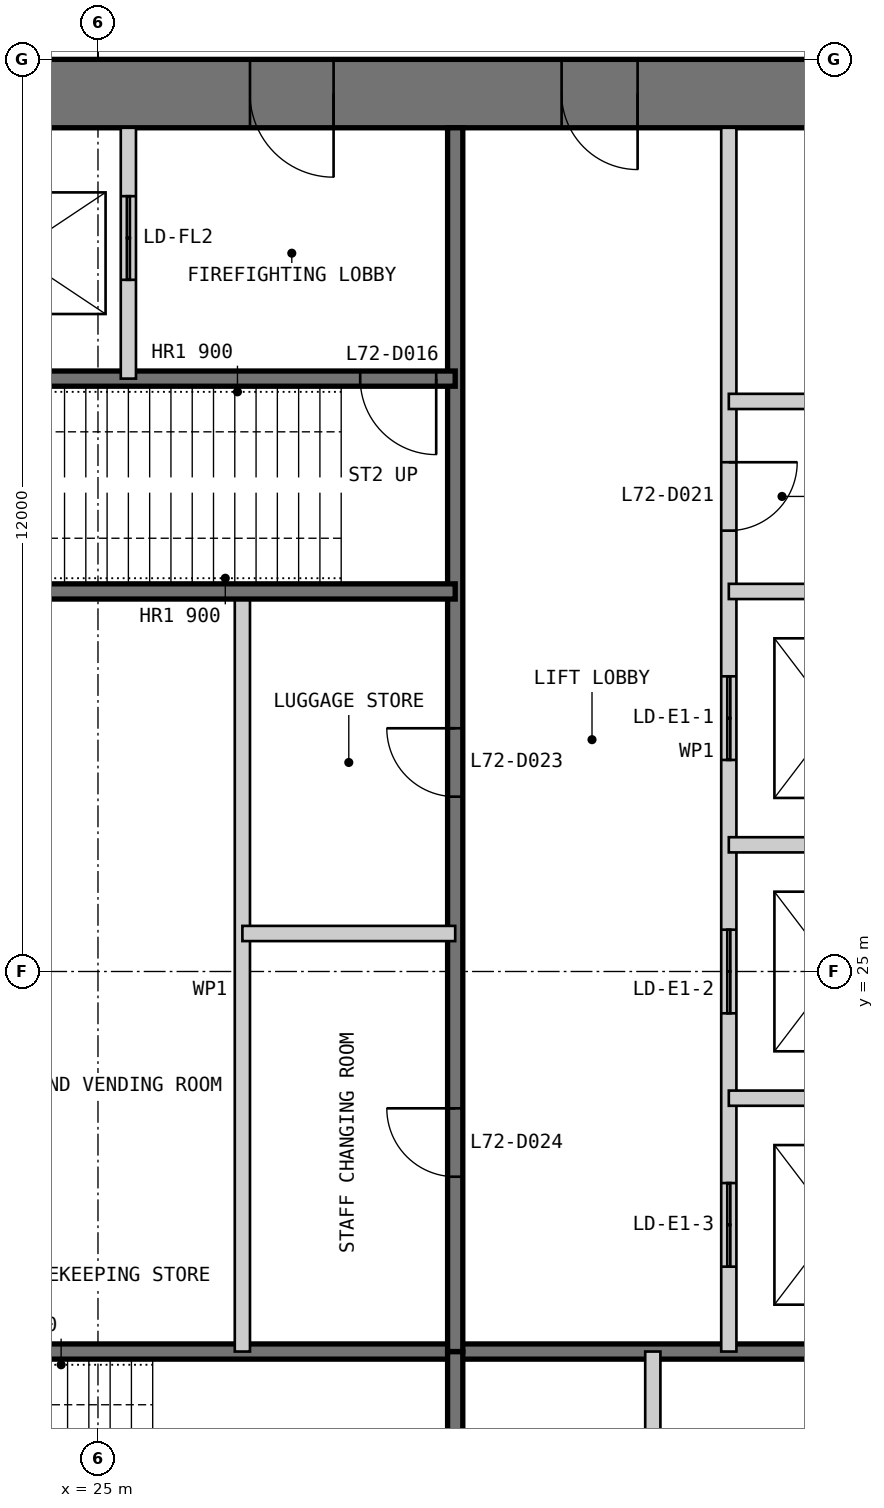
"""IFC4 building model, lengths in metres.
Left out: names, types, materials, properties, quantities, classifications, styles, units other than length and angle.
Written with IfcOpenShell. Run it as: python <this file> out.ifc"""

import sys

from ifc_helpers import new_model, si_unit, direction, frame, frame_2d, origin, place, context, subcontext, project, spatial, polyline, rectangle, outline, extrude, element, fill, save


model = new_model("IFC4")
c1 = context("Model", 3, precision=1e-05, world=origin(), true_north=direction((0.0, 1.0)))
c2 = subcontext(c1, "Body", "Model", "MODEL_VIEW")
j1 = project(units=[si_unit("LENGTHUNIT", "METRE"), si_unit("PLANEANGLEUNIT", "RADIAN")], contexts=[c1])
p1 = place(None, origin())
s1 = spatial("IfcSite", under=j1, at=p1, CompositionType="ELEMENT")
p2 = place(p1, origin())
s2 = spatial("IfcBuilding", under=s1, at=p2, CompositionType="ELEMENT")
p3 = place(p2, frame((0.0, 0.0, 296.8)))
s3 = spatial("IfcBuildingStorey", under=s2, at=p3, CompositionType="ELEMENT", Elevation=296.8)
p4 = place(p3, frame((37.0, 36.55, 0.0), z_axis=(0.0, 0.0, 1.0), x_axis=(-1.0, 0.0, 0.0)))
e1 = element("IfcWall", 1, at=p4, inside=s3, PredefinedType="SHEAR", context=c2, shape_type="SweptSolid", body=[
    extrude(outline(polyline([(0.0, -0.45), (24.0, -0.45), (23.1, 0.45), (0.9, 0.45), (0.0, -0.45)])), origin(), (0.0, 0.0, 1.0), 5.0),
])
p5 = place(p4, frame((4.9, 0.0, 0.0)))
e2 = element("IfcOpeningElement", 2, at=p5, cuts=e1, PredefinedType="OPENING", context=c2, shape_type="SweptSolid", body=[
    extrude(rectangle(XDim=1.0, YDim=2.2, at=frame_2d((0.5, 1.1))), frame((0.0, 0.46, 0.0), z_axis=(0.0, -1.0, 0.0), x_axis=(1.0, 0.0, 0.0)), (0.0, 0.0, 1.0), 0.92),
])
p6 = place(p4, frame((8.9, 0.0, 0.0)))
e3 = element("IfcOpeningElement", 3, at=p6, cuts=e1, PredefinedType="OPENING", context=c2, shape_type="SweptSolid", body=[
    extrude(rectangle(XDim=1.1, YDim=2.2, at=frame_2d((0.55, 1.1))), frame((0.0, 0.46, 0.0), z_axis=(0.0, -1.0, 0.0), x_axis=(1.0, 0.0, 0.0)), (0.0, 0.0, 1.0), 0.92),
])
p7 = place(p4, frame((15.05, 0.0, 0.0)))
e4 = element("IfcOpeningElement", 4, at=p7, cuts=e1, PredefinedType="OPENING", context=c2, shape_type="SweptSolid", body=[
    extrude(rectangle(XDim=0.9, YDim=2.2, at=frame_2d((0.45, 1.1))), frame((0.0, 0.46, 0.0), z_axis=(0.0, -1.0, 0.0), x_axis=(1.0, 0.0, 0.0)), (0.0, 0.0, 1.0), 0.92),
])
p8 = place(p4, frame((17.9, 0.0, 0.0)))
e5 = element("IfcOpeningElement", 5, at=p8, cuts=e1, PredefinedType="OPENING", context=c2, shape_type="SweptSolid", body=[
    extrude(rectangle(XDim=1.0, YDim=2.2, at=frame_2d((0.5, 1.1))), frame((0.0, 0.46, 0.0), z_axis=(0.0, -1.0, 0.0), x_axis=(1.0, 0.0, 0.0)), (0.0, 0.0, 1.0), 0.92),
])
p9 = place(p4, frame((21.4, 0.0, 0.0)))
e6 = element("IfcOpeningElement", 6, at=p9, cuts=e1, PredefinedType="OPENING", context=c2, shape_type="SweptSolid", body=[
    extrude(rectangle(XDim=1.0, YDim=2.2, at=frame_2d((0.5, 1.1))), frame((0.0, 0.46, 0.0), z_axis=(0.0, -1.0, 0.0), x_axis=(1.0, 0.0, 0.0)), (0.0, 0.0, 1.0), 0.92),
])
p10 = place(p3, frame((20.3, 20.0, 0.0), z_axis=(0.0, 0.0, 1.0), x_axis=(1.0, 0.0, 0.0)))
e7 = element("IfcWall", 7, at=p10, inside=s3, PredefinedType="SOLIDWALL", context=c2, shape_type="SweptSolid", body=[
    extrude(rectangle(XDim=15.8, YDim=0.2, at=frame_2d((7.9, 0.0))), origin(), (0.0, 0.0, 1.0), 4.8),
])
p11 = place(p3, frame((29.7, 13.9, 0.0), z_axis=(0.0, 0.0, 1.0), x_axis=(0.0, 1.0, 0.0)))
e8 = element("IfcWall", 8, at=p11, inside=s3, PredefinedType="SOLIDWALL", context=c2, shape_type="SweptSolid", body=[
    extrude(rectangle(XDim=6.1, YDim=0.2, at=frame_2d((3.05, 0.0))), origin(), (0.0, 0.0, 1.0), 4.8),
])
p12 = place(p3, frame((32.3, 13.9, 0.0), z_axis=(0.0, 0.0, 1.0), x_axis=(0.0, 1.0, 0.0)))
e9 = element("IfcWall", 9, at=p12, inside=s3, PredefinedType="PARTITIONING", context=c2, shape_type="SweptSolid", body=[
    extrude(rectangle(XDim=6.1, YDim=0.2, at=frame_2d((3.05, 0.0))), origin(), (0.0, 0.0, 1.0), 4.8),
])
p13 = place(p3, frame((33.3, 36.1, 0.0), z_axis=(0.0, 0.0, 1.0), x_axis=(0.0, -1.0, 0.0)))
e10 = element("IfcWall", 10, at=p13, inside=s3, PredefinedType="PARTITIONING", context=c2, shape_type="SweptSolid", body=[
    extrude(rectangle(XDim=16.1, YDim=0.2, at=frame_2d((8.05, 0.0))), origin(), (0.0, 0.0, 1.0), 4.8),
])
p14 = place(p13, frame((4.4, 0.0, 0.0)))
e11 = element("IfcOpeningElement", 11, at=p14, cuts=e10, PredefinedType="OPENING", context=c2, shape_type="SweptSolid", body=[
    extrude(rectangle(XDim=0.9, YDim=2.2, at=frame_2d((0.45, 1.1))), frame((0.0, 0.11, 0.0), z_axis=(0.0, -1.0, 0.0), x_axis=(1.0, 0.0, 0.0)), (0.0, 0.0, 1.0), 0.22),
])
p15 = place(p13, frame((7.217, 0.0, 0.0)))
e12 = element("IfcOpeningElement", 12, at=p15, cuts=e10, PredefinedType="OPENING", context=c2, shape_type="SweptSolid", body=[
    extrude(rectangle(XDim=1.1, YDim=2.2, at=frame_2d((0.55, 1.1))), frame((0.0, 0.11, 0.0), z_axis=(0.0, -1.0, 0.0), x_axis=(1.0, 0.0, 0.0)), (0.0, 0.0, 1.0), 0.22),
])
p16 = place(p13, frame((10.55, 0.0, 0.0)))
e13 = element("IfcOpeningElement", 13, at=p16, cuts=e10, PredefinedType="OPENING", context=c2, shape_type="SweptSolid", body=[
    extrude(rectangle(XDim=1.1, YDim=2.2, at=frame_2d((0.55, 1.1))), frame((0.0, 0.11, 0.0), z_axis=(0.0, -1.0, 0.0), x_axis=(1.0, 0.0, 0.0)), (0.0, 0.0, 1.0), 0.22),
])
p17 = place(p13, frame((13.883, 0.0, 0.0)))
e14 = element("IfcOpeningElement", 14, at=p17, cuts=e10, PredefinedType="OPENING", context=c2, shape_type="SweptSolid", body=[
    extrude(rectangle(XDim=1.1, YDim=2.2, at=frame_2d((0.55, 1.1))), frame((0.0, 0.11, 0.0), z_axis=(0.0, -1.0, 0.0), x_axis=(1.0, 0.0, 0.0)), (0.0, 0.0, 1.0), 0.22),
])
p18 = place(p3, frame((29.7, 36.1, 0.0), z_axis=(0.0, 0.0, 1.0), x_axis=(0.0, -1.0, 0.0)))
e15 = element("IfcWall", 15, at=p18, inside=s3, PredefinedType="SOLIDWALL", context=c2, shape_type="SweptSolid", body=[
    extrude(rectangle(XDim=16.1, YDim=0.2, at=frame_2d((8.05, 0.0))), origin(), (0.0, 0.0, 1.0), 4.8),
])
p19 = place(p18, frame((7.9, 0.0, 0.0)))
e16 = element("IfcOpeningElement", 16, at=p19, cuts=e15, PredefinedType="OPENING", context=c2, shape_type="SweptSolid", body=[
    extrude(rectangle(XDim=0.9, YDim=2.2, at=frame_2d((0.45, 1.1))), frame((0.0, 0.11, 0.0), z_axis=(0.0, -1.0, 0.0), x_axis=(1.0, 0.0, 0.0)), (0.0, 0.0, 1.0), 0.22),
])
p20 = place(p18, frame((12.9, 0.0, 0.0)))
e17 = element("IfcOpeningElement", 17, at=p20, cuts=e15, PredefinedType="OPENING", context=c2, shape_type="SweptSolid", body=[
    extrude(rectangle(XDim=0.9, YDim=2.2, at=frame_2d((0.45, 1.1))), frame((0.0, 0.11, 0.0), z_axis=(0.0, -1.0, 0.0), x_axis=(1.0, 0.0, 0.0)), (0.0, 0.0, 1.0), 0.22),
])
for number, where, z_axis, x_axis in (
    (18, (36.1, 30.0, 0.0), (0.0, 0.0, 1.0), (-1.0, 0.0, 0.0)),
    (19, (36.1, 26.667, 0.0), (0.0, 0.0, 1.0), (-1.0, 0.0, 0.0)),
    (20, (36.1, 23.333, 0.0), (0.0, 0.0, 1.0), (-1.0, 0.0, 0.0)),
):
    element("IfcWall", number, at=place(p3, frame(where, z_axis=z_axis, x_axis=x_axis)), inside=s3, PredefinedType="PARTITIONING", context=c2, shape_type="SweptSolid", body=[
        extrude(rectangle(XDim=2.8, YDim=0.2, at=frame_2d((1.4, 0.0))), origin(), (0.0, 0.0, 1.0), 4.8),
    ])
p21 = place(p3, frame((26.9, 30.0, 0.0), z_axis=(0.0, 0.0, 1.0), x_axis=(0.0, -1.0, 0.0)))
e21 = element("IfcWall", 21, at=p21, inside=s3, PredefinedType="PARTITIONING", context=c2, shape_type="SweptSolid", body=[
    extrude(rectangle(XDim=10.0, YDim=0.2, at=frame_2d((5.0, 0.0))), origin(), (0.0, 0.0, 1.0), 4.8),
])
p22 = place(p3, frame((29.7, 32.8, 0.0), z_axis=(0.0, 0.0, 1.0), x_axis=(-1.0, 0.0, 0.0)))
e22 = element("IfcWall", 22, at=p22, inside=s3, PredefinedType="SOLIDWALL", context=c2, shape_type="SweptSolid", body=[
    extrude(rectangle(XDim=9.4, YDim=0.2, at=frame_2d((4.7, 0.0))), origin(), (0.0, 0.0, 1.0), 4.8),
])
p23 = place(p22, frame((0.25, 0.0, 0.0)))
e23 = element("IfcOpeningElement", 23, at=p23, cuts=e22, PredefinedType="OPENING", context=c2, shape_type="SweptSolid", body=[
    extrude(rectangle(XDim=1.0, YDim=2.2, at=frame_2d((0.5, 1.1))), frame((0.0, 0.11, 0.0), z_axis=(0.0, -1.0, 0.0), x_axis=(1.0, 0.0, 0.0)), (0.0, 0.0, 1.0), 0.22),
])
p24 = place(p3, frame((29.7, 30.0, 0.0), z_axis=(0.0, 0.0, 1.0), x_axis=(-1.0, 0.0, 0.0)))
e24 = element("IfcWall", 24, at=p24, inside=s3, PredefinedType="SOLIDWALL", context=c2, shape_type="SweptSolid", body=[
    extrude(rectangle(XDim=15.8, YDim=0.2, at=frame_2d((7.9, 0.0))), origin(), (0.0, 0.0, 1.0), 4.8),
])
p25 = place(p3, frame((25.4, 36.1, 0.0), z_axis=(0.0, 0.0, 1.0), x_axis=(0.0, -1.0, 0.0)))
e25 = element("IfcWall", 25, at=p25, inside=s3, PredefinedType="PARTITIONING", context=c2, shape_type="SweptSolid", body=[
    extrude(rectangle(XDim=3.3, YDim=0.2, at=frame_2d((1.65, 0.0))), origin(), (0.0, 0.0, 1.0), 4.8),
])
p26 = place(p25, frame((0.9, 0.0, 0.0)))
e26 = element("IfcOpeningElement", 26, at=p26, cuts=e25, PredefinedType="OPENING", context=c2, shape_type="SweptSolid", body=[
    extrude(rectangle(XDim=1.1, YDim=2.2, at=frame_2d((0.55, 1.1))), frame((0.0, 0.11, 0.0), z_axis=(0.0, -1.0, 0.0), x_axis=(1.0, 0.0, 0.0)), (0.0, 0.0, 1.0), 0.22),
])
for number, where, z_axis, x_axis in (
    (27, (36.1, 32.5, 0.0), (0.0, 0.0, 1.0), (-1.0, 0.0, 0.0)),
    (28, (29.7, 25.5, 0.0), (0.0, 0.0, 1.0), (-1.0, 0.0, 0.0)),
):
    element("IfcWall", number, at=place(p3, frame(where, z_axis=z_axis, x_axis=x_axis)), inside=s3, PredefinedType="PARTITIONING", context=c2, shape_type="SweptSolid", body=[
        extrude(rectangle(XDim=2.8, YDim=0.2, at=frame_2d((1.4, 0.0))), origin(), (0.0, 0.0, 1.0), 4.8),
    ])
p27 = place(p5, origin())
e29 = element("IfcDoor", 29, at=p27, inside=s3, OperationType="SINGLE_SWING_LEFT", PredefinedType="DOOR", context=c2, shape_type="SweptSolid", body=[
    extrude(rectangle(XDim=1.0, YDim=2.2, at=frame_2d((0.5, 1.1))), frame((0.0, 0.025, 0.0), z_axis=(0.0, -1.0, 0.0), x_axis=(1.0, 0.0, 0.0)), (0.0, 0.0, 1.0), 0.05),
    extrude(outline(polyline([(0.0, 0.0), (0.04, 0.0), (0.04, 2.16), (0.96, 2.16), (0.96, 0.0), (1.0, 0.0), (1.0, 2.2), (0.0, 2.2), (0.0, 0.0)])), frame((0.0, 0.3, 0.0), z_axis=(0.0, -1.0, 0.0), x_axis=(1.0, 0.0, 0.0)), (0.0, 0.0, 1.0), 0.6),
])
fill(e2, e29)
p28 = place(p6, origin())
e30 = element("IfcDoor", 30, at=p28, inside=s3, OperationType="SINGLE_SWING_LEFT", PredefinedType="DOOR", context=c2, shape_type="SweptSolid", body=[
    extrude(rectangle(XDim=1.1, YDim=2.2, at=frame_2d((0.55, 1.1))), frame((0.0, 0.025, 0.0), z_axis=(0.0, -1.0, 0.0), x_axis=(1.0, 0.0, 0.0)), (0.0, 0.0, 1.0), 0.05),
    extrude(outline(polyline([(0.0, 0.0), (0.04, 0.0), (0.04, 2.16), (1.06, 2.16), (1.06, 0.0), (1.1, 0.0), (1.1, 2.2), (0.0, 2.2), (0.0, 0.0)])), frame((0.0, 0.3, 0.0), z_axis=(0.0, -1.0, 0.0), x_axis=(1.0, 0.0, 0.0)), (0.0, 0.0, 1.0), 0.6),
])
fill(e3, e30)
p29 = place(p23, origin())
e31 = element("IfcDoor", 31, at=p29, inside=s3, OperationType="SINGLE_SWING_LEFT", PredefinedType="DOOR", context=c2, shape_type="SweptSolid", body=[
    extrude(rectangle(XDim=1.0, YDim=2.2, at=frame_2d((0.5, 1.1))), frame((0.0, 0.025, 0.0), z_axis=(0.0, -1.0, 0.0), x_axis=(1.0, 0.0, 0.0)), (0.0, 0.0, 1.0), 0.05),
])
fill(e23, e31)
p30 = place(p14, origin())
e32 = element("IfcDoor", 32, at=p30, inside=s3, OperationType="SINGLE_SWING_LEFT", PredefinedType="DOOR", context=c2, shape_type="SweptSolid", body=[
    extrude(rectangle(XDim=0.9, YDim=2.2, at=frame_2d((0.45, 1.1))), frame((0.0, 0.025, 0.0), z_axis=(0.0, -1.0, 0.0), x_axis=(1.0, 0.0, 0.0)), (0.0, 0.0, 1.0), 0.05),
])
fill(e11, e32)
p31 = place(p19, frame((0.9, 0.0, 0.0), z_axis=(0.0, 0.0, 1.0), x_axis=(-1.0, 0.0, 0.0)))
e33 = element("IfcDoor", 33, at=p31, inside=s3, OperationType="SINGLE_SWING_RIGHT", PredefinedType="DOOR", context=c2, shape_type="SweptSolid", body=[
    extrude(rectangle(XDim=0.9, YDim=2.2, at=frame_2d((0.45, 1.1))), frame((0.0, 0.025, 0.0), z_axis=(0.0, -1.0, 0.0), x_axis=(1.0, 0.0, 0.0)), (0.0, 0.0, 1.0), 0.05),
])
fill(e16, e33)
p32 = place(p20, frame((0.9, 0.0, 0.0), z_axis=(0.0, 0.0, 1.0), x_axis=(-1.0, 0.0, 0.0)))
e34 = element("IfcDoor", 34, at=p32, inside=s3, OperationType="SINGLE_SWING_RIGHT", PredefinedType="DOOR", context=c2, shape_type="SweptSolid", body=[
    extrude(rectangle(XDim=0.9, YDim=2.2, at=frame_2d((0.45, 1.1))), frame((0.0, 0.025, 0.0), z_axis=(0.0, -1.0, 0.0), x_axis=(1.0, 0.0, 0.0)), (0.0, 0.0, 1.0), 0.05),
])
fill(e17, e34)
p33 = place(p26, origin())
e35 = element("IfcDoor", 35, at=p33, inside=s3, OperationType="DOUBLE_DOOR_SLIDING", PredefinedType="DOOR", context=c2, shape_type="SweptSolid", body=[
    extrude(rectangle(XDim=1.1, YDim=2.2, at=frame_2d((0.55, 1.1))), frame((0.0, 0.025, 0.0), z_axis=(0.0, -1.0, 0.0), x_axis=(1.0, 0.0, 0.0)), (0.0, 0.0, 1.0), 0.05),
])
fill(e26, e35)
p34 = place(p15, origin())
e36 = element("IfcDoor", 36, at=p34, inside=s3, OperationType="DOUBLE_DOOR_SLIDING", PredefinedType="DOOR", context=c2, shape_type="SweptSolid", body=[
    extrude(rectangle(XDim=1.1, YDim=2.2, at=frame_2d((0.55, 1.1))), frame((0.0, 0.025, 0.0), z_axis=(0.0, -1.0, 0.0), x_axis=(1.0, 0.0, 0.0)), (0.0, 0.0, 1.0), 0.05),
])
fill(e12, e36)
p35 = place(p16, origin())
e37 = element("IfcDoor", 37, at=p35, inside=s3, OperationType="DOUBLE_DOOR_SLIDING", PredefinedType="DOOR", context=c2, shape_type="SweptSolid", body=[
    extrude(rectangle(XDim=1.1, YDim=2.2, at=frame_2d((0.55, 1.1))), frame((0.0, 0.025, 0.0), z_axis=(0.0, -1.0, 0.0), x_axis=(1.0, 0.0, 0.0)), (0.0, 0.0, 1.0), 0.05),
])
fill(e13, e37)
p36 = place(p17, origin())
e38 = element("IfcDoor", 38, at=p36, inside=s3, OperationType="DOUBLE_DOOR_SLIDING", PredefinedType="DOOR", context=c2, shape_type="SweptSolid", body=[
    extrude(rectangle(XDim=1.1, YDim=2.2, at=frame_2d((0.55, 1.1))), frame((0.0, 0.025, 0.0), z_axis=(0.0, -1.0, 0.0), x_axis=(1.0, 0.0, 0.0)), (0.0, 0.0, 1.0), 0.05),
])
fill(e14, e38)
save(model, sys.argv[1])
